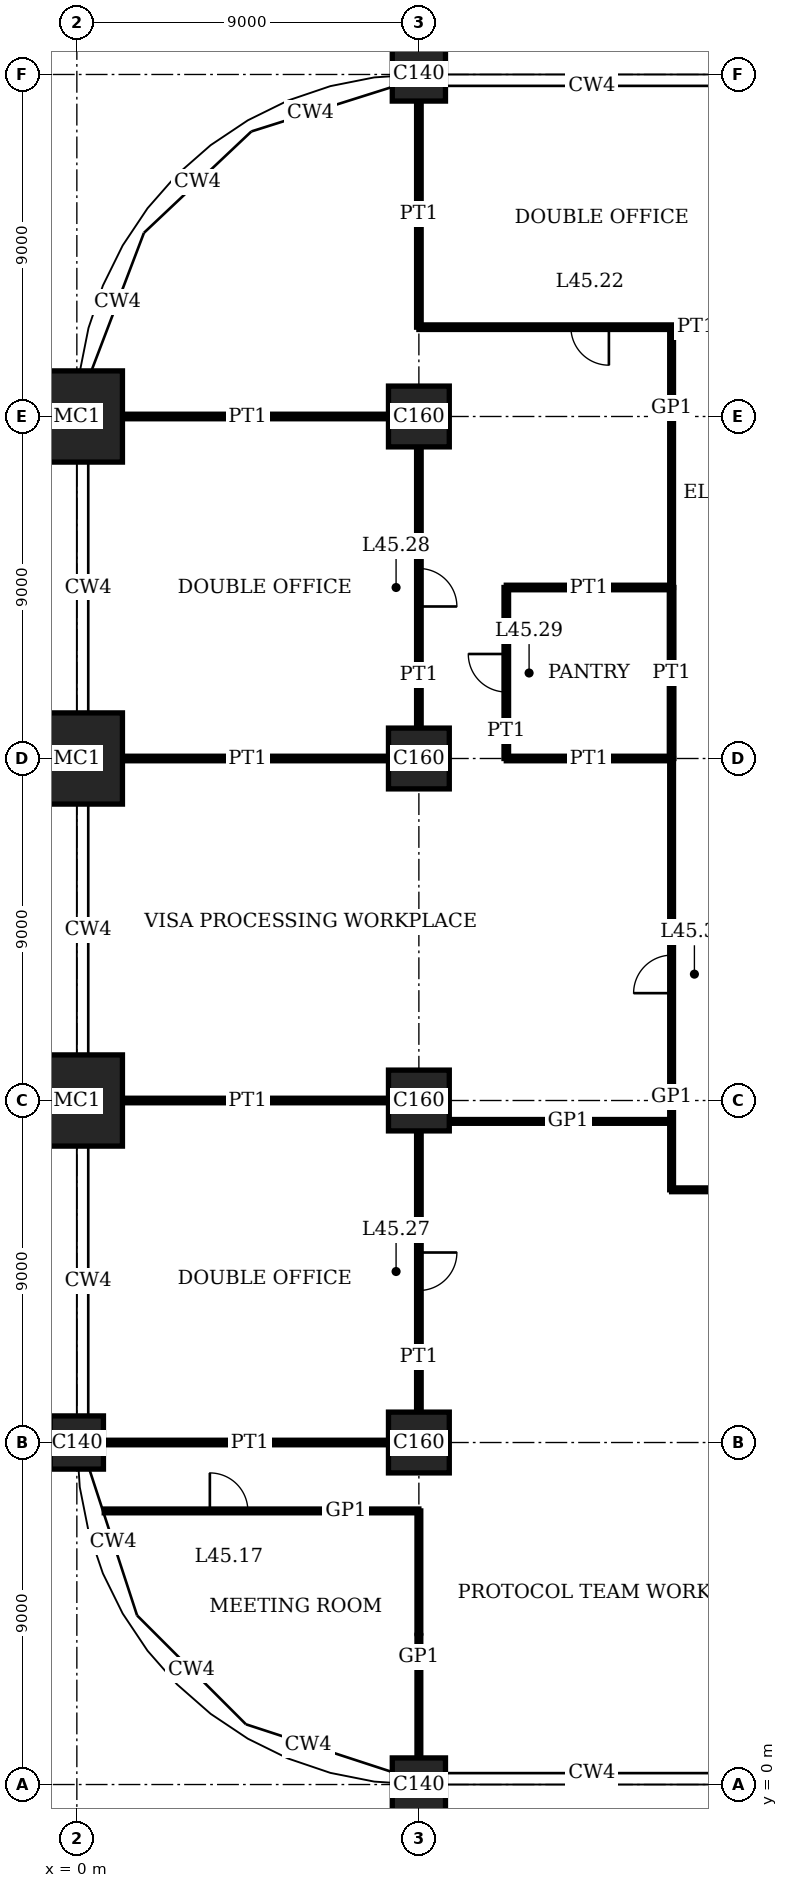
"""IFC4 building model, lengths in metres.
Left out: names, types, materials, properties, quantities, classifications, styles, units other than length and angle.
Written with IfcOpenShell. Run it as: python <this file> out.ifc"""

import sys

from ifc_helpers import new_model, si_unit, direction, frame, frame_2d, origin, origin_2d, place, context, subcontext, project, spatial, rectangle, extrude, element, fill, save


model = new_model("IFC4")
c1 = context("Model", 3, precision=1e-05, world=origin(), true_north=direction((0.0, 1.0)))
c2 = subcontext(c1, "Body", "Model", "MODEL_VIEW")
j1 = project(units=[si_unit("LENGTHUNIT", "METRE"), si_unit("PLANEANGLEUNIT", "RADIAN")], contexts=[c1])
p1 = place(None, origin())
s1 = spatial("IfcSite", under=j1, at=p1, CompositionType="ELEMENT")
p2 = place(p1, origin())
s2 = spatial("IfcBuilding", under=s1, at=p2, CompositionType="ELEMENT")
p3 = place(p2, frame((0.0, 0.0, 186.2)))
s3 = spatial("IfcBuildingStorey", under=s2, at=p3, CompositionType="ELEMENT", Elevation=186.2)
p4 = place(p3, frame((0.0, 9.0, 0.0), z_axis=(0.0, 0.0, 1.0), x_axis=(1.0, 0.0, 0.0)))
e1 = element("IfcColumn", 1, at=p4, inside=s3, PredefinedType="COLUMN", context=c2, shape_type="SweptSolid", body=[
    extrude(rectangle(XDim=1.4, YDim=1.4, at=origin_2d()), origin(), (0.0, 0.0, 1.0), 4.0),
])
for number, where, z_axis, x_axis in (
    (2, (0.0, 18.0, 0.0), (0.0, 0.0, 1.0), (1.0, 0.0, 0.0)),
    (3, (0.0, 27.0, 0.0), (0.0, 0.0, 1.0), (1.0, 0.0, 0.0)),
    (4, (0.0, 36.0, 0.0), (0.0, 0.0, 1.0), (1.0, 0.0, 0.0)),
):
    element("IfcColumn", number, at=place(p3, frame(where, z_axis=z_axis, x_axis=x_axis)), inside=s3, PredefinedType="COLUMN", context=c2, shape_type="SweptSolid", body=[
        extrude(rectangle(XDim=2.4, YDim=2.4, at=origin_2d()), origin(), (0.0, 0.0, 1.0), 4.0),
    ])
p5 = place(p3, frame((9.0, 0.0, 0.0), z_axis=(0.0, 0.0, 1.0), x_axis=(1.0, 0.0, 0.0)))
e5 = element("IfcColumn", 5, at=p5, inside=s3, PredefinedType="COLUMN", context=c2, shape_type="SweptSolid", body=[
    extrude(rectangle(XDim=1.4, YDim=1.4, at=origin_2d()), origin(), (0.0, 0.0, 1.0), 4.0),
])
for number, where, z_axis, x_axis in (
    (6, (9.0, 9.0, 0.0), (0.0, 0.0, 1.0), (1.0, 0.0, 0.0)),
    (7, (9.0, 18.0, 0.0), (0.0, 0.0, 1.0), (1.0, 0.0, 0.0)),
    (8, (9.0, 27.0, 0.0), (0.0, 0.0, 1.0), (1.0, 0.0, 0.0)),
    (9, (9.0, 36.0, 0.0), (0.0, 0.0, 1.0), (1.0, 0.0, 0.0)),
):
    element("IfcColumn", number, at=place(p3, frame(where, z_axis=z_axis, x_axis=x_axis)), inside=s3, PredefinedType="COLUMN", context=c2, shape_type="SweptSolid", body=[
        extrude(rectangle(XDim=1.6, YDim=1.6, at=origin_2d()), origin(), (0.0, 0.0, 1.0), 4.0),
    ])
p6 = place(p3, frame((9.0, 45.0, 0.0), z_axis=(0.0, 0.0, 1.0), x_axis=(1.0, 0.0, 0.0)))
e10 = element("IfcColumn", 10, at=p6, inside=s3, PredefinedType="COLUMN", context=c2, shape_type="SweptSolid", body=[
    extrude(rectangle(XDim=1.4, YDim=1.4, at=origin_2d()), origin(), (0.0, 0.0, 1.0), 4.0),
])
p7 = place(p3, frame((0.72, 7.2, 0.0), z_axis=(0.0, 0.0, 1.0), x_axis=(1.0, 0.0, 0.0)))
e11 = element("IfcWall", 11, at=p7, inside=s3, PredefinedType="PARTITIONING", context=c2, shape_type="SweptSolid", body=[
    extrude(rectangle(XDim=8.28, YDim=0.1, at=frame_2d((4.14, 0.0))), origin(), (0.0, 0.0, 1.0), 3.75),
])
p8 = place(p7, frame((2.78, 0.0, 0.0)))
e12 = element("IfcOpeningElement", 12, at=p8, cuts=e11, PredefinedType="OPENING", context=c2, shape_type="SweptSolid", body=[
    extrude(rectangle(XDim=1.0, YDim=2.4, at=frame_2d((0.5, 1.2))), frame((0.0, 0.06, 0.0), z_axis=(0.0, -1.0, 0.0), x_axis=(1.0, 0.0, 0.0)), (0.0, 0.0, 1.0), 0.12),
])
p9 = place(p3, frame((0.7, 9.0, 0.0), z_axis=(0.0, 0.0, 1.0), x_axis=(1.0, 0.0, 0.0)))
e13 = element("IfcWall", 13, at=p9, inside=s3, PredefinedType="PARTITIONING", context=c2, shape_type="SweptSolid", body=[
    extrude(rectangle(XDim=7.5, YDim=0.12, at=frame_2d((3.75, 0.0))), origin(), (0.0, 0.0, 1.0), 3.05),
])
p10 = place(p3, frame((15.65, 15.65, 0.0), z_axis=(0.0, 0.0, 1.0), x_axis=(1.0, 0.0, 0.0)))
e14 = element("IfcWall", 14, at=p10, inside=s3, PredefinedType="PARTITIONING", context=c2, shape_type="SweptSolid", body=[
    extrude(rectangle(XDim=6.85, YDim=0.1, at=frame_2d((3.425, 0.0))), origin(), (0.0, 0.0, 1.0), 3.75),
])
p11 = place(p10, frame((2.925, 0.0, 0.0)))
e15 = element("IfcOpeningElement", 15, at=p11, cuts=e14, PredefinedType="OPENING", context=c2, shape_type="SweptSolid", body=[
    extrude(rectangle(XDim=1.0, YDim=2.4, at=frame_2d((0.5, 1.2))), frame((0.0, 0.06, 0.0), z_axis=(0.0, -1.0, 0.0), x_axis=(1.0, 0.0, 0.0)), (0.0, 0.0, 1.0), 0.12),
])
p12 = place(p3, frame((9.8, 17.45, 0.0), z_axis=(0.0, 0.0, 1.0), x_axis=(1.0, 0.0, 0.0)))
e16 = element("IfcWall", 16, at=p12, inside=s3, PredefinedType="PARTITIONING", context=c2, shape_type="SweptSolid", body=[
    extrude(rectangle(XDim=5.85, YDim=0.1, at=frame_2d((2.925, 0.0))), origin(), (0.0, 0.0, 1.0), 3.75),
])
for number, where, z_axis, x_axis in (
    (17, (1.2, 18.0, 0.0), (0.0, 0.0, 1.0), (1.0, 0.0, 0.0)),
    (18, (1.2, 27.0, 0.0), (0.0, 0.0, 1.0), (1.0, 0.0, 0.0)),
):
    element("IfcWall", number, at=place(p3, frame(where, z_axis=z_axis, x_axis=x_axis)), inside=s3, PredefinedType="PARTITIONING", context=c2, shape_type="SweptSolid", body=[
        extrude(rectangle(XDim=7.0, YDim=0.12, at=frame_2d((3.5, 0.0))), origin(), (0.0, 0.0, 1.0), 3.05),
    ])
p13 = place(p3, frame((11.3, 27.0, 0.0), z_axis=(0.0, 0.0, 1.0), x_axis=(1.0, 0.0, 0.0)))
e19 = element("IfcWall", 19, at=p13, inside=s3, PredefinedType="PARTITIONING", context=c2, shape_type="SweptSolid", body=[
    extrude(rectangle(XDim=4.35, YDim=0.12, at=frame_2d((2.175, 0.0))), origin(), (0.0, 0.0, 1.0), 3.05),
])
p14 = place(p3, frame((11.3, 31.5, 0.0), z_axis=(0.0, 0.0, 1.0), x_axis=(1.0, 0.0, 0.0)))
e20 = element("IfcWall", 20, at=p14, inside=s3, PredefinedType="PARTITIONING", context=c2, shape_type="SweptSolid", body=[
    extrude(rectangle(XDim=4.35, YDim=0.12, at=frame_2d((2.175, 0.0))), origin(), (0.0, 0.0, 1.0), 3.1),
])
p15 = place(p3, frame((1.2, 36.0, 0.0), z_axis=(0.0, 0.0, 1.0), x_axis=(1.0, 0.0, 0.0)))
e21 = element("IfcWall", 21, at=p15, inside=s3, PredefinedType="PARTITIONING", context=c2, shape_type="SweptSolid", body=[
    extrude(rectangle(XDim=7.0, YDim=0.12, at=frame_2d((3.5, 0.0))), origin(), (0.0, 0.0, 1.0), 3.05),
])
p16 = place(p3, frame((9.0, 38.35, 0.0), z_axis=(0.0, 0.0, 1.0), x_axis=(1.0, 0.0, 0.0)))
e22 = element("IfcWall", 22, at=p16, inside=s3, PredefinedType="PARTITIONING", context=c2, shape_type="SweptSolid", body=[
    extrude(rectangle(XDim=9.0, YDim=0.12, at=frame_2d((4.5, 0.0))), origin(), (0.0, 0.0, 1.0), 3.75),
])
p17 = place(p16, frame((4.0, 0.0, 0.0)))
e23 = element("IfcOpeningElement", 23, at=p17, cuts=e22, PredefinedType="OPENING", context=c2, shape_type="SweptSolid", body=[
    extrude(rectangle(XDim=1.0, YDim=2.4, at=frame_2d((0.5, 1.2))), frame((0.0, 0.07, 0.0), z_axis=(0.0, -1.0, 0.0), x_axis=(1.0, 0.0, 0.0)), (0.0, 0.0, 1.0), 0.14),
])
p18 = place(p3, frame((9.0, 38.35, 0.0), z_axis=(0.0, 0.0, 1.0), x_axis=(0.0, 1.0, 0.0)))
e24 = element("IfcWall", 24, at=p18, inside=s3, PredefinedType="PARTITIONING", context=c2, shape_type="SweptSolid", body=[
    extrude(rectangle(XDim=5.95, YDim=0.12, at=frame_2d((2.975, 0.0))), origin(), (0.0, 0.0, 1.0), 3.05),
])
p19 = place(p3, frame((9.0, 9.8, 0.0), z_axis=(0.0, 0.0, 1.0), x_axis=(0.0, 1.0, 0.0)))
e25 = element("IfcWall", 25, at=p19, inside=s3, PredefinedType="PARTITIONING", context=c2, shape_type="SweptSolid", body=[
    extrude(rectangle(XDim=7.4, YDim=0.12, at=frame_2d((3.7, 0.0))), origin(), (0.0, 0.0, 1.0), 3.05),
])
p20 = place(p19, frame((3.2, 0.0, 0.0)))
e26 = element("IfcOpeningElement", 26, at=p20, cuts=e25, PredefinedType="OPENING", context=c2, shape_type="SweptSolid", body=[
    extrude(rectangle(XDim=1.0, YDim=2.4, at=frame_2d((0.5, 1.2))), frame((0.0, 0.07, 0.0), z_axis=(0.0, -1.0, 0.0), x_axis=(1.0, 0.0, 0.0)), (0.0, 0.0, 1.0), 0.14),
])
p21 = place(p3, frame((9.0, 27.8, 0.0), z_axis=(0.0, 0.0, 1.0), x_axis=(0.0, 1.0, 0.0)))
e27 = element("IfcWall", 27, at=p21, inside=s3, PredefinedType="PARTITIONING", context=c2, shape_type="SweptSolid", body=[
    extrude(rectangle(XDim=7.4, YDim=0.12, at=frame_2d((3.7, 0.0))), origin(), (0.0, 0.0, 1.0), 3.05),
])
p22 = place(p21, frame((3.2, 0.0, 0.0)))
e28 = element("IfcOpeningElement", 28, at=p22, cuts=e27, PredefinedType="OPENING", context=c2, shape_type="SweptSolid", body=[
    extrude(rectangle(XDim=1.0, YDim=2.4, at=frame_2d((0.5, 1.2))), frame((0.0, 0.07, 0.0), z_axis=(0.0, -1.0, 0.0), x_axis=(1.0, 0.0, 0.0)), (0.0, 0.0, 1.0), 0.14),
])
p23 = place(p3, frame((9.0, 0.7, 0.0), z_axis=(0.0, 0.0, 1.0), x_axis=(0.0, 1.0, 0.0)))
e29 = element("IfcWall", 29, at=p23, inside=s3, PredefinedType="PARTITIONING", context=c2, shape_type="SweptSolid", body=[
    extrude(rectangle(XDim=6.5, YDim=0.1, at=frame_2d((3.25, 0.0))), origin(), (0.0, 0.0, 1.0), 3.05),
])
p24 = place(p3, frame((11.3, 27.0, 0.0), z_axis=(0.0, 0.0, 1.0), x_axis=(0.0, 1.0, 0.0)))
e30 = element("IfcWall", 30, at=p24, inside=s3, PredefinedType="PARTITIONING", context=c2, shape_type="SweptSolid", body=[
    extrude(rectangle(XDim=4.5, YDim=0.12, at=frame_2d((2.25, 0.0))), origin(), (0.0, 0.0, 1.0), 3.75),
])
p25 = place(p24, frame((1.75, 0.0, 0.0)))
e31 = element("IfcOpeningElement", 31, at=p25, cuts=e30, PredefinedType="OPENING", context=c2, shape_type="SweptSolid", body=[
    extrude(rectangle(XDim=1.0, YDim=2.4, at=frame_2d((0.5, 1.2))), frame((0.0, 0.07, 0.0), z_axis=(0.0, -1.0, 0.0), x_axis=(1.0, 0.0, 0.0)), (0.0, 0.0, 1.0), 0.14),
])
p26 = place(p3, frame((15.65, 27.0, 0.0), z_axis=(0.0, 0.0, 1.0), x_axis=(0.0, 1.0, 0.0)))
e32 = element("IfcWall", 32, at=p26, inside=s3, PredefinedType="PARTITIONING", context=c2, shape_type="SweptSolid", body=[
    extrude(rectangle(XDim=4.5, YDim=0.12, at=frame_2d((2.25, 0.0))), origin(), (0.0, 0.0, 1.0), 3.75),
])
p27 = place(p3, frame((15.65, 15.65, 0.0), z_axis=(0.0, 0.0, 1.0), x_axis=(0.0, 1.0, 0.0)))
e33 = element("IfcWall", 33, at=p27, inside=s3, PredefinedType="PARTITIONING", context=c2, shape_type="SweptSolid", body=[
    extrude(rectangle(XDim=11.35, YDim=0.1, at=frame_2d((5.675, 0.0))), origin(), (0.0, 0.0, 1.0), 3.75),
])
p28 = place(p27, frame((5.175, 0.0, 0.0)))
e34 = element("IfcOpeningElement", 34, at=p28, cuts=e33, PredefinedType="OPENING", context=c2, shape_type="SweptSolid", body=[
    extrude(rectangle(XDim=1.0, YDim=2.4, at=frame_2d((0.5, 1.2))), frame((0.0, 0.06, 0.0), z_axis=(0.0, -1.0, 0.0), x_axis=(1.0, 0.0, 0.0)), (0.0, 0.0, 1.0), 0.12),
])
p29 = place(p3, frame((15.65, 31.5, 0.0), z_axis=(0.0, 0.0, 1.0), x_axis=(0.0, 1.0, 0.0)))
e35 = element("IfcWall", 35, at=p29, inside=s3, PredefinedType="PARTITIONING", context=c2, shape_type="SweptSolid", body=[
    extrude(rectangle(XDim=6.85, YDim=0.1, at=frame_2d((3.425, 0.0))), origin(), (0.0, 0.0, 1.0), 3.75),
])
p30 = place(p8, origin())
e36 = element("IfcDoor", 36, at=p30, inside=s3, OperationType="SINGLE_SWING_RIGHT", PredefinedType="DOOR", context=c2, shape_type="SweptSolid", body=[
    extrude(rectangle(XDim=1.0, YDim=2.4, at=frame_2d((0.5, 1.2))), frame((0.0, 0.02, 0.0), z_axis=(0.0, -1.0, 0.0), x_axis=(1.0, 0.0, 0.0)), (0.0, 0.0, 1.0), 0.04),
])
fill(e12, e36)
p31 = place(p17, origin())
e37 = element("IfcDoor", 37, at=p31, inside=s3, OperationType="SINGLE_SWING_RIGHT", PredefinedType="DOOR", context=c2, shape_type="SweptSolid", body=[
    extrude(rectangle(XDim=1.0, YDim=2.4, at=frame_2d((0.5, 1.2))), frame((0.0, 0.025, 0.0), z_axis=(0.0, -1.0, 0.0), x_axis=(1.0, 0.0, 0.0)), (0.0, 0.0, 1.0), 0.05),
])
fill(e23, e37)
p32 = place(p20, origin())
e38 = element("IfcDoor", 38, at=p32, inside=s3, OperationType="SINGLE_SWING_RIGHT", PredefinedType="DOOR", context=c2, shape_type="SweptSolid", body=[
    extrude(rectangle(XDim=1.0, YDim=2.4, at=frame_2d((0.5, 1.2))), frame((0.0, 0.025, 0.0), z_axis=(0.0, -1.0, 0.0), x_axis=(1.0, 0.0, 0.0)), (0.0, 0.0, 1.0), 0.05),
])
fill(e26, e38)
p33 = place(p22, origin())
e39 = element("IfcDoor", 39, at=p33, inside=s3, OperationType="SINGLE_SWING_LEFT", PredefinedType="DOOR", context=c2, shape_type="SweptSolid", body=[
    extrude(rectangle(XDim=1.0, YDim=2.4, at=frame_2d((0.5, 1.2))), frame((0.0, 0.025, 0.0), z_axis=(0.0, -1.0, 0.0), x_axis=(1.0, 0.0, 0.0)), (0.0, 0.0, 1.0), 0.05),
])
fill(e28, e39)
p34 = place(p25, origin())
e40 = element("IfcDoor", 40, at=p34, inside=s3, OperationType="SINGLE_SWING_LEFT", PredefinedType="DOOR", context=c2, shape_type="SweptSolid", body=[
    extrude(rectangle(XDim=1.0, YDim=2.4, at=frame_2d((0.5, 1.2))), frame((0.0, 0.025, 0.0), z_axis=(0.0, -1.0, 0.0), x_axis=(1.0, 0.0, 0.0)), (0.0, 0.0, 1.0), 0.05),
])
fill(e31, e40)
p35 = place(p28, origin())
e41 = element("IfcDoor", 41, at=p35, inside=s3, OperationType="SINGLE_SWING_RIGHT", PredefinedType="DOOR", context=c2, shape_type="SweptSolid", body=[
    extrude(rectangle(XDim=1.0, YDim=2.4, at=frame_2d((0.5, 1.2))), frame((0.0, 0.02, 0.0), z_axis=(0.0, -1.0, 0.0), x_axis=(1.0, 0.0, 0.0)), (0.0, 0.0, 1.0), 0.04),
])
fill(e34, e41)
save(model, sys.argv[1])
